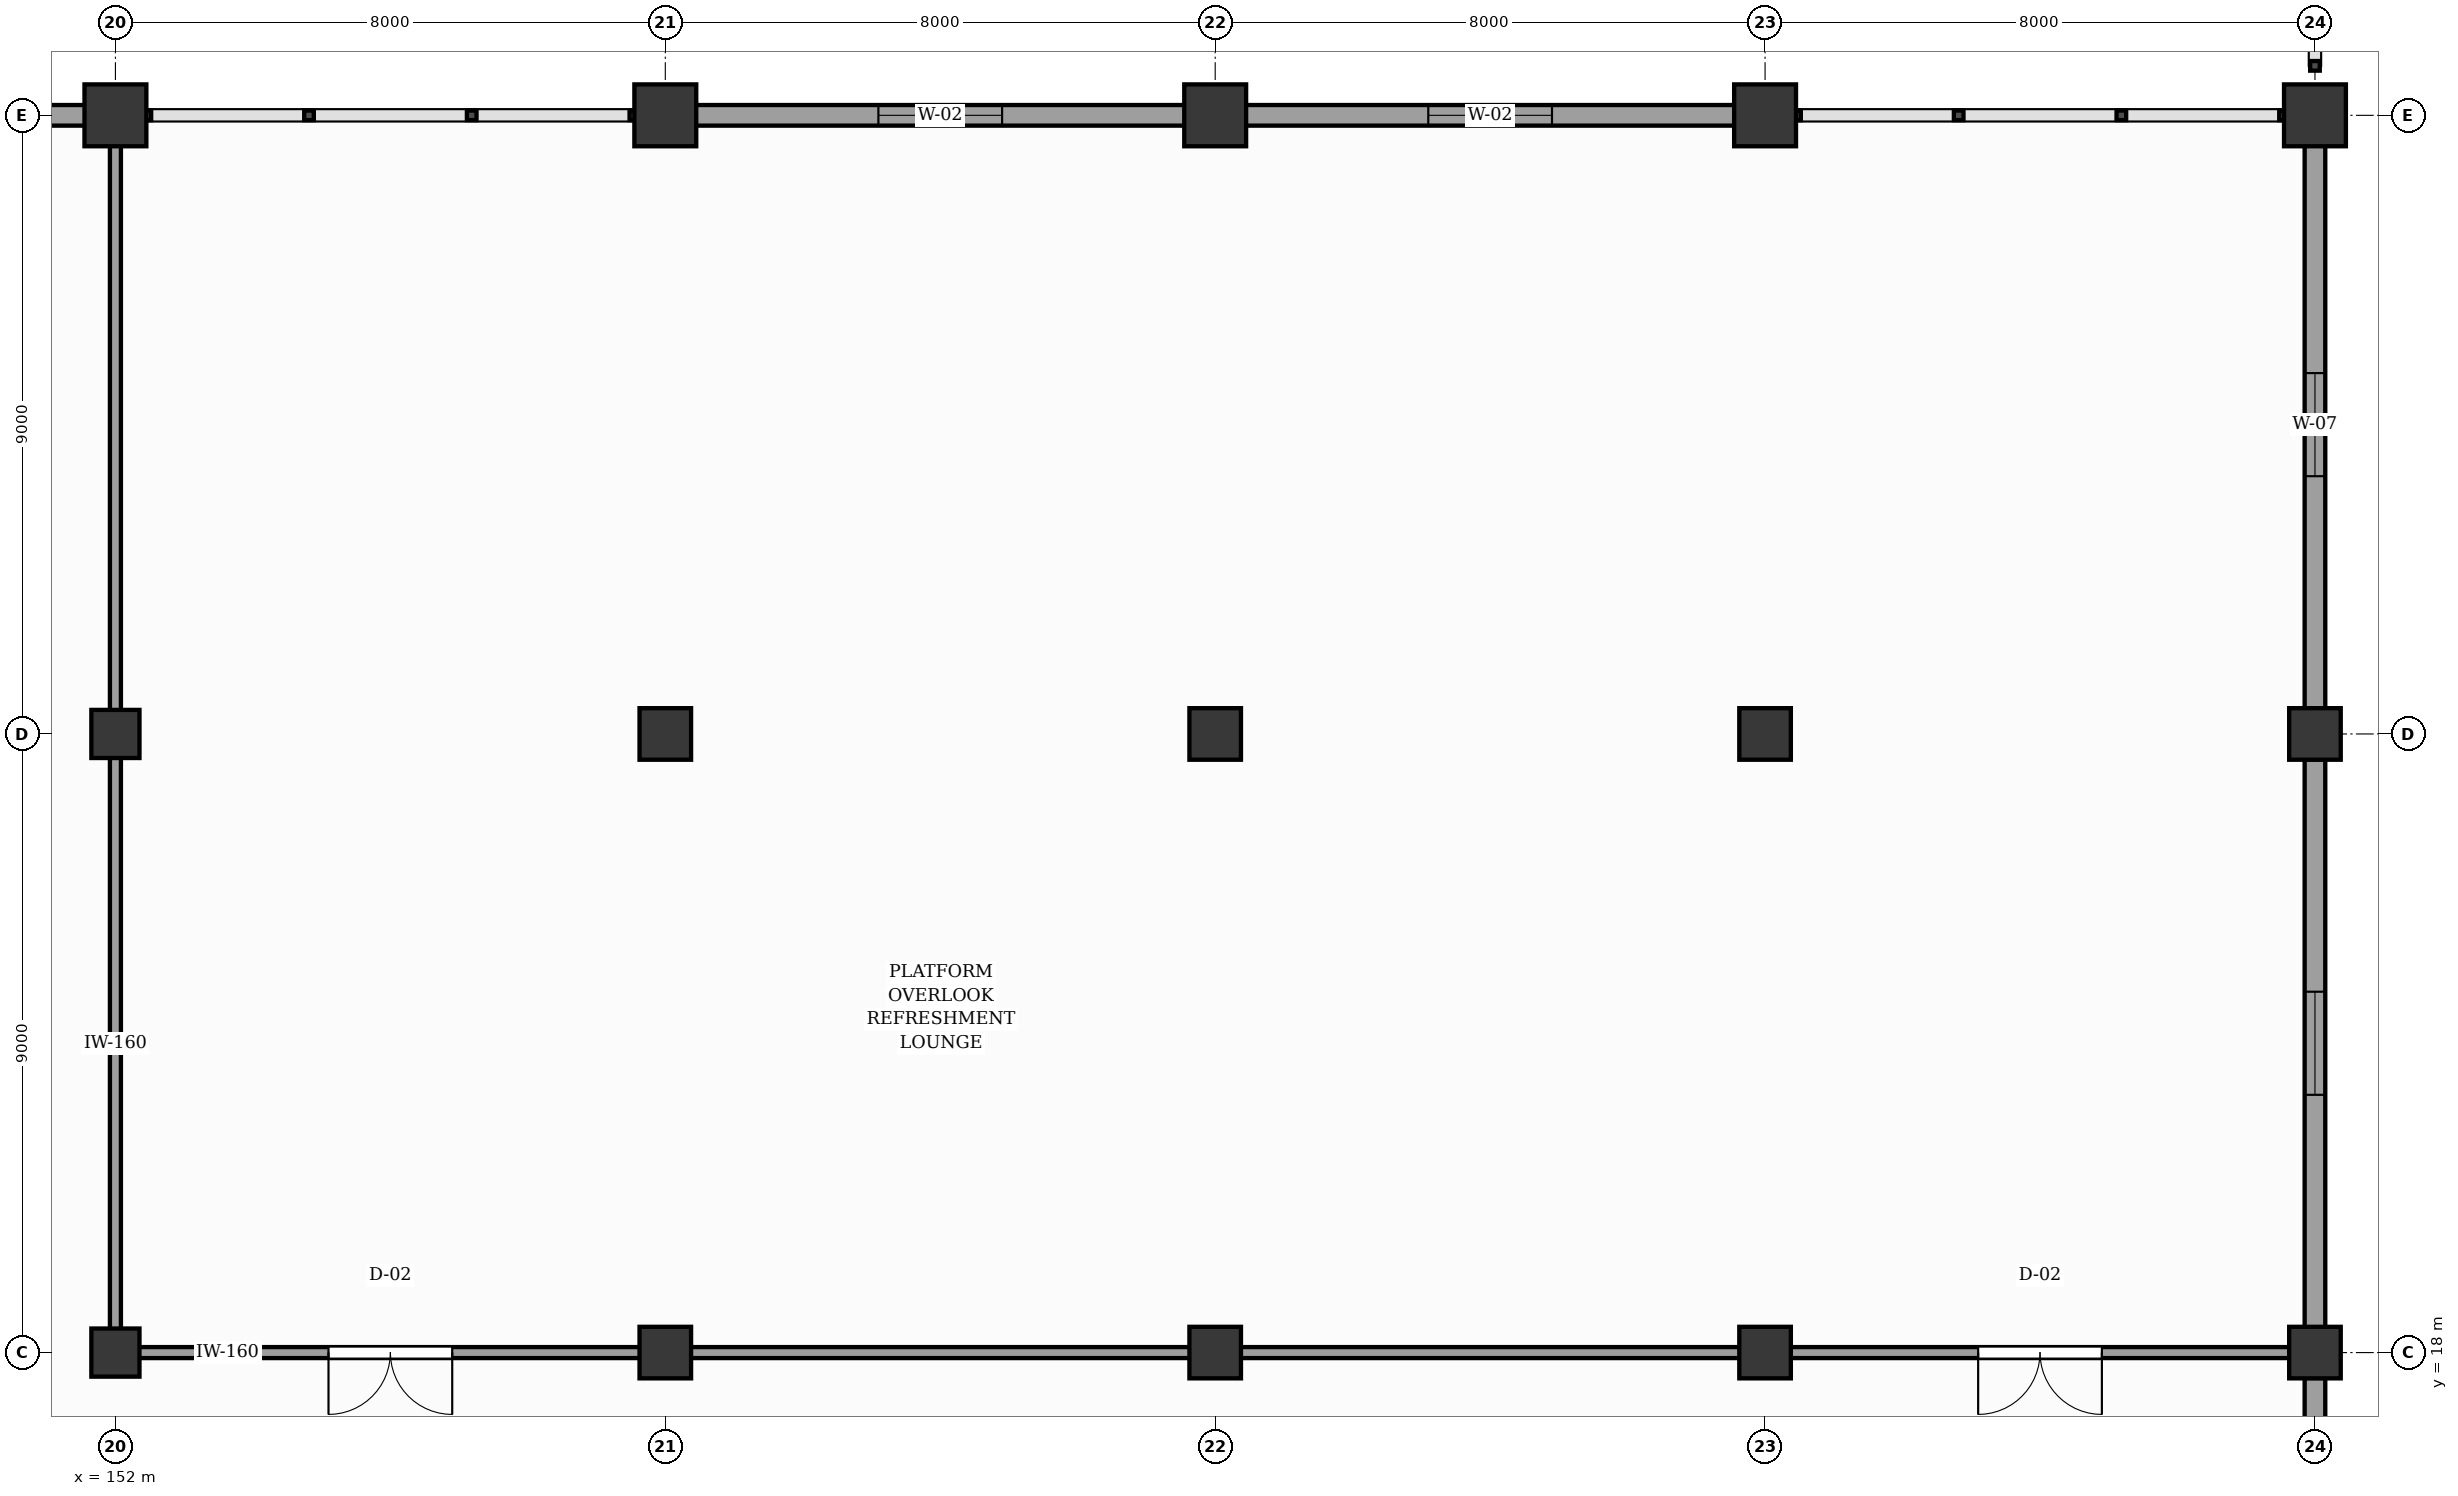
"""IFC4 building model, lengths in metres.
Left out: names, types, materials, properties, quantities, classifications, styles, units other than length and angle.
Written with IfcOpenShell. Run it as: python <this file> out.ifc"""

import sys

from ifc_helpers import new_model, si_unit, direction, frame, frame_2d, origin, origin_2d, place, context, subcontext, project, spatial, rectangle, extrude, element, fill, save


model = new_model("IFC4")
c1 = context("Model", 3, precision=1e-05, world=origin(), true_north=direction((0.0, 1.0)))
c2 = subcontext(c1, "Body", "Model", "MODEL_VIEW")
j1 = project(units=[si_unit("LENGTHUNIT", "METRE"), si_unit("PLANEANGLEUNIT", "RADIAN")], contexts=[c1])
p1 = place(None, origin())
s1 = spatial("IfcSite", under=j1, at=p1, CompositionType="ELEMENT")
p2 = place(p1, origin())
s2 = spatial("IfcBuilding", under=s1, at=p2, CompositionType="ELEMENT")
p3 = place(p2, frame((0.0, 0.0, 9.6)))
s3 = spatial("IfcBuildingStorey", under=s2, at=p3, CompositionType="ELEMENT", Elevation=9.6)
for number, where, z_axis, x_axis in (
    (1, (152.0, 18.0, 0.0), (0.0, 0.0, 1.0), (1.0, 0.0, 0.0)),
    (2, (152.0, 27.0, 0.0), (0.0, 0.0, 1.0), (1.0, 0.0, 0.0)),
):
    element("IfcColumn", number, at=place(p3, frame(where, z_axis=z_axis, x_axis=x_axis)), inside=s3, PredefinedType="COLUMN", context=c2, shape_type="SweptSolid", body=[
        extrude(rectangle(XDim=0.7, YDim=0.7, at=origin_2d()), origin(), (0.0, 0.0, 1.0), 6.6),
    ])
p4 = place(p3, frame((152.0, 36.0, 0.0), z_axis=(0.0, 0.0, 1.0), x_axis=(1.0, 0.0, 0.0)))
e3 = element("IfcColumn", 3, at=p4, inside=s3, PredefinedType="COLUMN", context=c2, shape_type="SweptSolid", body=[
    extrude(rectangle(XDim=0.9, YDim=0.9, at=origin_2d()), origin(), (0.0, 0.0, 1.0), 6.6),
])
for number, where, z_axis, x_axis in (
    (4, (160.0, 18.0, 0.0), (0.0, 0.0, 1.0), (1.0, 0.0, 0.0)),
    (5, (160.0, 27.0, 0.0), (0.0, 0.0, 1.0), (1.0, 0.0, 0.0)),
):
    element("IfcColumn", number, at=place(p3, frame(where, z_axis=z_axis, x_axis=x_axis)), inside=s3, PredefinedType="COLUMN", context=c2, shape_type="SweptSolid", body=[
        extrude(rectangle(XDim=0.75, YDim=0.75, at=origin_2d()), origin(), (0.0, 0.0, 1.0), 6.6),
    ])
p5 = place(p3, frame((160.0, 36.0, 0.0), z_axis=(0.0, 0.0, 1.0), x_axis=(1.0, 0.0, 0.0)))
e6 = element("IfcColumn", 6, at=p5, inside=s3, PredefinedType="COLUMN", context=c2, shape_type="SweptSolid", body=[
    extrude(rectangle(XDim=0.9, YDim=0.9, at=origin_2d()), origin(), (0.0, 0.0, 1.0), 6.6),
])
for number, where, z_axis, x_axis in (
    (7, (168.0, 18.0, 0.0), (0.0, 0.0, 1.0), (1.0, 0.0, 0.0)),
    (8, (168.0, 27.0, 0.0), (0.0, 0.0, 1.0), (1.0, 0.0, 0.0)),
):
    element("IfcColumn", number, at=place(p3, frame(where, z_axis=z_axis, x_axis=x_axis)), inside=s3, PredefinedType="COLUMN", context=c2, shape_type="SweptSolid", body=[
        extrude(rectangle(XDim=0.75, YDim=0.75, at=origin_2d()), origin(), (0.0, 0.0, 1.0), 6.6),
    ])
p6 = place(p3, frame((168.0, 36.0, 0.0), z_axis=(0.0, 0.0, 1.0), x_axis=(1.0, 0.0, 0.0)))
e9 = element("IfcColumn", 9, at=p6, inside=s3, PredefinedType="COLUMN", context=c2, shape_type="SweptSolid", body=[
    extrude(rectangle(XDim=0.9, YDim=0.9, at=origin_2d()), origin(), (0.0, 0.0, 1.0), 6.6),
])
for number, where, z_axis, x_axis in (
    (10, (176.0, 18.0, 0.0), (0.0, 0.0, 1.0), (1.0, 0.0, 0.0)),
    (11, (176.0, 27.0, 0.0), (0.0, 0.0, 1.0), (1.0, 0.0, 0.0)),
):
    element("IfcColumn", number, at=place(p3, frame(where, z_axis=z_axis, x_axis=x_axis)), inside=s3, PredefinedType="COLUMN", context=c2, shape_type="SweptSolid", body=[
        extrude(rectangle(XDim=0.75, YDim=0.75, at=origin_2d()), origin(), (0.0, 0.0, 1.0), 6.6),
    ])
p7 = place(p3, frame((176.0, 36.0, 0.0), z_axis=(0.0, 0.0, 1.0), x_axis=(1.0, 0.0, 0.0)))
e12 = element("IfcColumn", 12, at=p7, inside=s3, PredefinedType="COLUMN", context=c2, shape_type="SweptSolid", body=[
    extrude(rectangle(XDim=0.9, YDim=0.9, at=origin_2d()), origin(), (0.0, 0.0, 1.0), 6.6),
])
for number, where, z_axis, x_axis in (
    (13, (184.0, 18.0, 0.0), (0.0, 0.0, 1.0), (1.0, 0.0, 0.0)),
    (14, (184.0, 27.0, 0.0), (0.0, 0.0, 1.0), (1.0, 0.0, 0.0)),
):
    element("IfcColumn", number, at=place(p3, frame(where, z_axis=z_axis, x_axis=x_axis)), inside=s3, PredefinedType="COLUMN", context=c2, shape_type="SweptSolid", body=[
        extrude(rectangle(XDim=0.75, YDim=0.75, at=origin_2d()), origin(), (0.0, 0.0, 1.0), 6.6),
    ])
p8 = place(p3, frame((184.0, 36.0, 0.0), z_axis=(0.0, 0.0, 1.0), x_axis=(1.0, 0.0, 0.0)))
e15 = element("IfcColumn", 15, at=p8, inside=s3, PredefinedType="COLUMN", context=c2, shape_type="SweptSolid", body=[
    extrude(rectangle(XDim=0.9, YDim=0.9, at=origin_2d()), origin(), (0.0, 0.0, 1.0), 6.6),
])
p9 = place(p3, frame((144.345, 36.0, 0.0), z_axis=(0.0, 0.0, 1.0), x_axis=(1.0, 0.0, 0.0)))
e16 = element("IfcWall", 16, at=p9, inside=s3, PredefinedType="SOLIDWALL", context=c2, shape_type="SweptSolid", body=[
    extrude(rectangle(XDim=7.31, YDim=0.3, at=frame_2d((3.655, 0.0))), origin(), (0.0, 0.0, 1.0), 5.36),
])
p10 = place(p9, frame((2.755, 0.0, 0.95)))
e17 = element("IfcOpeningElement", 17, at=p10, cuts=e16, PredefinedType="OPENING", context=c2, shape_type="SweptSolid", body=[
    extrude(rectangle(XDim=1.8, YDim=2.6, at=frame_2d((0.9, 1.3))), frame((0.0, 0.16, 0.0), z_axis=(0.0, -1.0, 0.0), x_axis=(1.0, 0.0, 0.0)), (0.0, 0.0, 1.0), 0.32),
])
p11 = place(p3, frame((160.345, 36.0, 0.0), z_axis=(0.0, 0.0, 1.0), x_axis=(1.0, 0.0, 0.0)))
e18 = element("IfcWall", 18, at=p11, inside=s3, PredefinedType="SOLIDWALL", context=c2, shape_type="SweptSolid", body=[
    extrude(rectangle(XDim=7.31, YDim=0.3, at=frame_2d((3.655, 0.0))), origin(), (0.0, 0.0, 1.0), 5.36),
])
p12 = place(p11, frame((2.755, 0.0, 0.95)))
e19 = element("IfcOpeningElement", 19, at=p12, cuts=e18, PredefinedType="OPENING", context=c2, shape_type="SweptSolid", body=[
    extrude(rectangle(XDim=1.8, YDim=2.6, at=frame_2d((0.9, 1.3))), frame((0.0, 0.16, 0.0), z_axis=(0.0, -1.0, 0.0), x_axis=(1.0, 0.0, 0.0)), (0.0, 0.0, 1.0), 0.32),
])
p13 = place(p3, frame((168.345, 36.0, 0.0), z_axis=(0.0, 0.0, 1.0), x_axis=(1.0, 0.0, 0.0)))
e20 = element("IfcWall", 20, at=p13, inside=s3, PredefinedType="SOLIDWALL", context=c2, shape_type="SweptSolid", body=[
    extrude(rectangle(XDim=7.31, YDim=0.3, at=frame_2d((3.655, 0.0))), origin(), (0.0, 0.0, 1.0), 5.36),
])
p14 = place(p13, frame((2.755, 0.0, 0.95)))
e21 = element("IfcOpeningElement", 21, at=p14, cuts=e20, PredefinedType="OPENING", context=c2, shape_type="SweptSolid", body=[
    extrude(rectangle(XDim=1.8, YDim=2.6, at=frame_2d((0.9, 1.3))), frame((0.0, 0.16, 0.0), z_axis=(0.0, -1.0, 0.0), x_axis=(1.0, 0.0, 0.0)), (0.0, 0.0, 1.0), 0.32),
])
p15 = place(p3, frame((184.0, 9.37, 0.0), z_axis=(0.0, 0.0, 1.0), x_axis=(0.0, 1.0, 0.0)))
e22 = element("IfcWall", 22, at=p15, inside=s3, PredefinedType="SOLIDWALL", context=c2, shape_type="SweptSolid", body=[
    extrude(rectangle(XDim=8.26, YDim=0.3, at=frame_2d((4.13, 0.0))), origin(), (0.0, 0.0, 1.0), 5.51),
])
p16 = place(p15, frame((3.38, 0.0, 0.95)))
e23 = element("IfcOpeningElement", 23, at=p16, cuts=e22, PredefinedType="OPENING", context=c2, shape_type="SweptSolid", body=[
    extrude(rectangle(XDim=1.5, YDim=1.9, at=frame_2d((0.75, 0.95))), frame((0.0, 0.16, 0.0), z_axis=(0.0, -1.0, 0.0), x_axis=(1.0, 0.0, 0.0)), (0.0, 0.0, 1.0), 0.32),
])
p17 = place(p3, frame((184.0, 18.37, 0.0), z_axis=(0.0, 0.0, 1.0), x_axis=(0.0, 1.0, 0.0)))
e24 = element("IfcWall", 24, at=p17, inside=s3, PredefinedType="SOLIDWALL", context=c2, shape_type="SweptSolid", body=[
    extrude(rectangle(XDim=8.26, YDim=0.3, at=frame_2d((4.13, 0.0))), origin(), (0.0, 0.0, 1.0), 5.51),
])
p18 = place(p17, frame((3.38, 0.0, 0.95)))
e25 = element("IfcOpeningElement", 25, at=p18, cuts=e24, PredefinedType="OPENING", context=c2, shape_type="SweptSolid", body=[
    extrude(rectangle(XDim=1.5, YDim=1.9, at=frame_2d((0.75, 0.95))), frame((0.0, 0.16, 0.0), z_axis=(0.0, -1.0, 0.0), x_axis=(1.0, 0.0, 0.0)), (0.0, 0.0, 1.0), 0.32),
])
p19 = place(p3, frame((184.0, 27.37, 0.0), z_axis=(0.0, 0.0, 1.0), x_axis=(0.0, 1.0, 0.0)))
e26 = element("IfcWall", 26, at=p19, inside=s3, PredefinedType="SOLIDWALL", context=c2, shape_type="SweptSolid", body=[
    extrude(rectangle(XDim=8.23, YDim=0.3, at=frame_2d((4.115, 0.0))), origin(), (0.0, 0.0, 1.0), 5.36),
])
p20 = place(p19, frame((3.38, 0.0, 0.95)))
e27 = element("IfcOpeningElement", 27, at=p20, cuts=e26, PredefinedType="OPENING", context=c2, shape_type="SweptSolid", body=[
    extrude(rectangle(XDim=1.5, YDim=1.9, at=frame_2d((0.75, 0.95))), frame((0.0, 0.16, 0.0), z_axis=(0.0, -1.0, 0.0), x_axis=(1.0, 0.0, 0.0)), (0.0, 0.0, 1.0), 0.32),
])
p21 = place(p3, frame((152.3, 18.0, 0.0), z_axis=(0.0, 0.0, 1.0), x_axis=(1.0, 0.0, 0.0)))
e28 = element("IfcWall", 28, at=p21, inside=s3, PredefinedType="PARTITIONING", context=c2, shape_type="SweptSolid", body=[
    extrude(rectangle(XDim=7.4, YDim=0.16, at=frame_2d((3.7, 0.0))), origin(), (0.0, 0.0, 1.0), 5.5),
])
p22 = place(p21, frame((2.8, 0.0, 0.0)))
e29 = element("IfcOpeningElement", 29, at=p22, cuts=e28, PredefinedType="OPENING", context=c2, shape_type="SweptSolid", body=[
    extrude(rectangle(XDim=1.8, YDim=2.25, at=frame_2d((0.9, 1.125))), frame((0.0, 0.09, 0.0), z_axis=(0.0, -1.0, 0.0), x_axis=(1.0, 0.0, 0.0)), (0.0, 0.0, 1.0), 0.18),
])
for number, where, z_axis, x_axis in (
    (30, (160.3, 18.0, 0.0), (0.0, 0.0, 1.0), (1.0, 0.0, 0.0)),
    (31, (168.3, 18.0, 0.0), (0.0, 0.0, 1.0), (1.0, 0.0, 0.0)),
):
    element("IfcWall", number, at=place(p3, frame(where, z_axis=z_axis, x_axis=x_axis)), inside=s3, PredefinedType="PARTITIONING", context=c2, shape_type="SweptSolid", body=[
        extrude(rectangle(XDim=7.4, YDim=0.16, at=frame_2d((3.7, 0.0))), origin(), (0.0, 0.0, 1.0), 5.5),
    ])
p23 = place(p3, frame((176.3, 18.0, 0.0), z_axis=(0.0, 0.0, 1.0), x_axis=(1.0, 0.0, 0.0)))
e32 = element("IfcWall", 32, at=p23, inside=s3, PredefinedType="PARTITIONING", context=c2, shape_type="SweptSolid", body=[
    extrude(rectangle(XDim=7.4, YDim=0.16, at=frame_2d((3.7, 0.0))), origin(), (0.0, 0.0, 1.0), 5.5),
])
p24 = place(p23, frame((2.8, 0.0, 0.0)))
e33 = element("IfcOpeningElement", 33, at=p24, cuts=e32, PredefinedType="OPENING", context=c2, shape_type="SweptSolid", body=[
    extrude(rectangle(XDim=1.8, YDim=2.25, at=frame_2d((0.9, 1.125))), frame((0.0, 0.09, 0.0), z_axis=(0.0, -1.0, 0.0), x_axis=(1.0, 0.0, 0.0)), (0.0, 0.0, 1.0), 0.18),
])
p25 = place(p3, frame((152.0, 18.3, 0.0), z_axis=(0.0, 0.0, 1.0), x_axis=(0.0, 1.0, 0.0)))
e34 = element("IfcWall", 34, at=p25, inside=s3, PredefinedType="PARTITIONING", context=c2, shape_type="SweptSolid", body=[
    extrude(rectangle(XDim=8.4, YDim=0.16, at=frame_2d((4.2, 0.0))), origin(), (0.0, 0.0, 1.0), 5.5),
])
p26 = place(p3, frame((152.0, 27.3, 0.0), z_axis=(0.0, 0.0, 1.0), x_axis=(0.0, 1.0, 0.0)))
e35 = element("IfcWall", 35, at=p26, inside=s3, PredefinedType="PARTITIONING", context=c2, shape_type="SweptSolid", body=[
    extrude(rectangle(XDim=8.4, YDim=0.16, at=frame_2d((4.2, 0.0))), origin(), (0.0, 0.0, 1.0), 5.36),
])
p27 = place(p12, origin())
e36 = element("IfcWindow", 36, at=p27, inside=s3, PartitioningType="SINGLE_PANEL", PredefinedType="WINDOW", context=c2, shape_type="SweptSolid", body=[
    extrude(rectangle(XDim=1.8, YDim=2.6, at=frame_2d((0.9, 1.3))), frame((0.0, 0.03, 0.0), z_axis=(0.0, -1.0, 0.0), x_axis=(1.0, 0.0, 0.0)), (0.0, 0.0, 1.0), 0.06),
])
fill(e19, e36)
p28 = place(p14, origin())
e37 = element("IfcWindow", 37, at=p28, inside=s3, PartitioningType="SINGLE_PANEL", PredefinedType="WINDOW", context=c2, shape_type="SweptSolid", body=[
    extrude(rectangle(XDim=1.8, YDim=2.6, at=frame_2d((0.9, 1.3))), frame((0.0, 0.03, 0.0), z_axis=(0.0, -1.0, 0.0), x_axis=(1.0, 0.0, 0.0)), (0.0, 0.0, 1.0), 0.06),
])
fill(e21, e37)
p29 = place(p18, origin())
e38 = element("IfcWindow", 38, at=p29, inside=s3, PartitioningType="SINGLE_PANEL", PredefinedType="WINDOW", context=c2, shape_type="SweptSolid", body=[
    extrude(rectangle(XDim=1.5, YDim=1.9, at=frame_2d((0.75, 0.95))), frame((0.0, 0.03, 0.0), z_axis=(0.0, -1.0, 0.0), x_axis=(1.0, 0.0, 0.0)), (0.0, 0.0, 1.0), 0.06),
])
fill(e25, e38)
p30 = place(p20, origin())
e39 = element("IfcWindow", 39, at=p30, inside=s3, PartitioningType="SINGLE_PANEL", PredefinedType="WINDOW", context=c2, shape_type="SweptSolid", body=[
    extrude(rectangle(XDim=1.5, YDim=1.9, at=frame_2d((0.75, 0.95))), frame((0.0, 0.03, 0.0), z_axis=(0.0, -1.0, 0.0), x_axis=(1.0, 0.0, 0.0)), (0.0, 0.0, 1.0), 0.06),
])
fill(e27, e39)
p31 = place(p22, frame((1.8, 0.0, 0.0), z_axis=(0.0, 0.0, 1.0), x_axis=(-1.0, 0.0, 0.0)))
e40 = element("IfcDoor", 40, at=p31, inside=s3, OperationType="DOUBLE_DOOR_SINGLE_SWING", PredefinedType="DOOR", context=c2, shape_type="SweptSolid", body=[
    extrude(rectangle(XDim=1.8, YDim=2.25, at=frame_2d((0.9, 1.125))), frame((0.0, 0.025, 0.0), z_axis=(0.0, -1.0, 0.0), x_axis=(1.0, 0.0, 0.0)), (0.0, 0.0, 1.0), 0.05),
])
fill(e29, e40)
p32 = place(p24, frame((1.8, 0.0, 0.0), z_axis=(0.0, 0.0, 1.0), x_axis=(-1.0, 0.0, 0.0)))
e41 = element("IfcDoor", 41, at=p32, inside=s3, OperationType="DOUBLE_DOOR_SINGLE_SWING", PredefinedType="DOOR", context=c2, shape_type="SweptSolid", body=[
    extrude(rectangle(XDim=1.8, YDim=2.25, at=frame_2d((0.9, 1.125))), frame((0.0, 0.025, 0.0), z_axis=(0.0, -1.0, 0.0), x_axis=(1.0, 0.0, 0.0)), (0.0, 0.0, 1.0), 0.05),
])
fill(e33, e41)
save(model, sys.argv[1])
